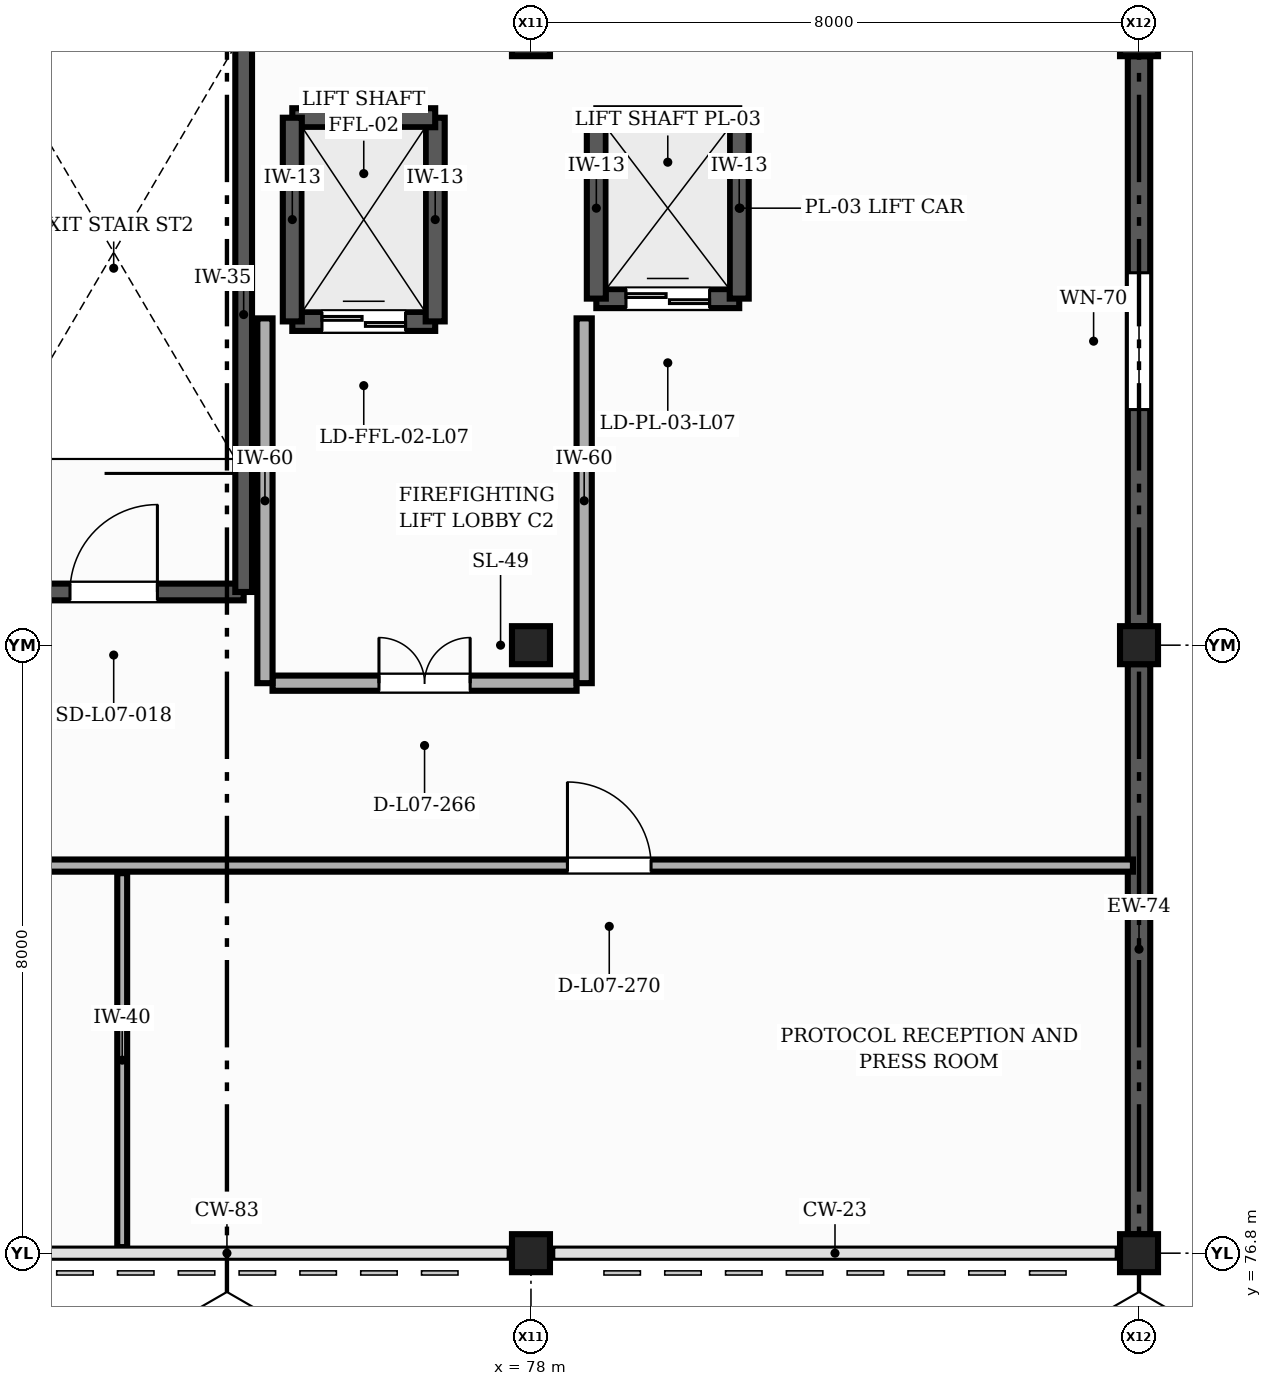
"""IFC4 building model, lengths in metres.
Left out: names, types, materials, properties, quantities, classifications, styles, units other than length and angle.
Written with IfcOpenShell. Run it as: python <this file> out.ifc"""

import sys

from ifc_helpers import new_model, si_unit, direction, frame, frame_2d, origin, origin_2d, place, context, subcontext, project, spatial, rectangle, extrude, element, fill, save


model = new_model("IFC4")
c1 = context("Model", 3, precision=1e-05, world=origin(), true_north=direction((0.0, 1.0)))
c2 = subcontext(c1, "Body", "Model", "MODEL_VIEW")
j1 = project(units=[si_unit("LENGTHUNIT", "METRE"), si_unit("PLANEANGLEUNIT", "RADIAN")], contexts=[c1])
p1 = place(None, origin())
s1 = spatial("IfcSite", under=j1, at=p1, CompositionType="ELEMENT")
p2 = place(p1, origin())
s2 = spatial("IfcBuilding", under=s1, at=p2, CompositionType="ELEMENT")
p3 = place(p2, frame((0.0, 0.0, 29.7)))
s3 = spatial("IfcBuildingStorey", under=s2, at=p3, CompositionType="ELEMENT", Elevation=29.7)
for number, where, z_axis, x_axis in (
    (1, (78.0, 76.8, 0.0), (0.0, 0.0, 1.0), (1.0, 0.0, 0.0)),
    (2, (78.0, 84.8, 0.0), (0.0, 0.0, 1.0), (1.0, 0.0, 0.0)),
    (3, (78.0, 92.8, 0.0), (0.0, 0.0, 1.0), (1.0, 0.0, 0.0)),
    (4, (86.0, 76.8, 0.0), (0.0, 0.0, 1.0), (1.0, 0.0, 0.0)),
    (5, (86.0, 84.8, 0.0), (0.0, 0.0, 1.0), (1.0, 0.0, 0.0)),
    (6, (86.0, 92.8, 0.0), (0.0, 0.0, 1.0), (1.0, 0.0, 0.0)),
):
    element("IfcColumn", number, at=place(p3, frame(where, z_axis=z_axis, x_axis=x_axis)), inside=s3, PredefinedType="COLUMN", context=c2, shape_type="SweptSolid", body=[
        extrude(rectangle(XDim=0.5, YDim=0.5, at=origin_2d()), origin(), (0.0, 0.0, 1.0), 3.9),
    ])
p4 = place(p3, frame((86.0, 77.05, 0.0), z_axis=(0.0, 0.0, 1.0), x_axis=(0.0, 1.0, 0.0)))
e7 = element("IfcWall", 7, at=p4, inside=s3, PredefinedType="SOLIDWALL", context=c2, shape_type="SweptSolid", body=[
    extrude(rectangle(XDim=7.5, YDim=0.295, at=frame_2d((3.75, 0.0))), origin(), (0.0, 0.0, 1.0), 2.98),
])
p5 = place(p3, frame((86.0, 85.05, 0.0), z_axis=(0.0, 0.0, 1.0), x_axis=(0.0, 1.0, 0.0)))
e8 = element("IfcWall", 8, at=p5, inside=s3, PredefinedType="SOLIDWALL", context=c2, shape_type="SweptSolid", body=[
    extrude(rectangle(XDim=7.5, YDim=0.295, at=frame_2d((3.75, 0.0))), origin(), (0.0, 0.0, 1.0), 2.98),
])
p6 = place(p5, frame((2.85, 0.0, 0.9)))
e9 = element("IfcOpeningElement", 9, at=p6, cuts=e8, PredefinedType="OPENING", context=c2, shape_type="SweptSolid", body=[
    extrude(rectangle(XDim=1.8, YDim=1.4, at=frame_2d((0.9, 0.7))), frame((0.0, 0.157, 0.0), z_axis=(0.0, -1.0, 0.0), x_axis=(1.0, 0.0, 0.0)), (0.0, 0.0, 1.0), 0.315),
])
p7 = place(p3, frame((70.8, 85.5, 0.0), z_axis=(0.0, 0.0, 1.0), x_axis=(1.0, 0.0, 0.0)))
e10 = element("IfcWall", 10, at=p7, inside=s3, PredefinedType="SHEAR", context=c2, shape_type="SweptSolid", body=[
    extrude(rectangle(XDim=3.42, YDim=0.22, at=frame_2d((1.71, 0.0))), origin(), (0.0, 0.0, 1.0), 3.9),
])
p8 = place(p7, frame((1.135, 0.0, 0.0)))
e11 = element("IfcOpeningElement", 11, at=p8, cuts=e10, PredefinedType="OPENING", context=c2, shape_type="SweptSolid", body=[
    extrude(rectangle(XDim=1.15, YDim=2.15, at=frame_2d((0.575, 1.075))), frame((0.0, 0.12, 0.0), z_axis=(0.0, -1.0, 0.0), x_axis=(1.0, 0.0, 0.0)), (0.0, 0.0, 1.0), 0.24),
])
p9 = place(p3, frame((74.22, 85.5, 0.0), z_axis=(0.0, 0.0, 1.0), x_axis=(0.0, 1.0, 0.0)))
e12 = element("IfcWall", 12, at=p9, inside=s3, PredefinedType="SHEAR", context=c2, shape_type="SweptSolid", body=[
    extrude(rectangle(XDim=7.3, YDim=0.22, at=frame_2d((3.65, 0.0))), origin(), (0.0, 0.0, 1.0), 3.9),
])
p10 = place(p3, frame((74.86, 89.06, 0.0), z_axis=(0.0, 0.0, 1.0), x_axis=(1.0, 0.0, 0.0)))
e13 = element("IfcWall", 13, at=p10, inside=s3, PredefinedType="SHEAR", context=c2, shape_type="SweptSolid", body=[
    extrude(rectangle(XDim=1.88, YDim=0.25, at=frame_2d((0.94, 0.0))), origin(), (0.0, 0.0, 1.0), 5.52),
])
p11 = place(p10, frame((0.39, 0.0, 0.0)))
e14 = element("IfcOpeningElement", 14, at=p11, cuts=e13, PredefinedType="OPENING", context=c2, shape_type="SweptSolid", body=[
    extrude(rectangle(XDim=1.1, YDim=2.2, at=frame_2d((0.55, 1.1))), frame((0.0, 0.135, 0.0), z_axis=(0.0, -1.0, 0.0), x_axis=(1.0, 0.0, 0.0)), (0.0, 0.0, 1.0), 0.27),
])
p12 = place(p3, frame((76.74, 89.06, 0.0), z_axis=(0.0, 0.0, 1.0), x_axis=(0.0, 1.0, 0.0)))
e15 = element("IfcWall", 15, at=p12, inside=s3, PredefinedType="SHEAR", context=c2, shape_type="SweptSolid", body=[
    extrude(rectangle(XDim=2.68, YDim=0.25, at=frame_2d((1.34, 0.0))), origin(), (0.0, 0.0, 1.0), 5.52),
])
p13 = place(p3, frame((76.74, 91.74, 0.0), z_axis=(0.0, 0.0, 1.0), x_axis=(-1.0, 0.0, 0.0)))
e16 = element("IfcWall", 16, at=p13, inside=s3, PredefinedType="SHEAR", context=c2, shape_type="SweptSolid", body=[
    extrude(rectangle(XDim=1.88, YDim=0.25, at=frame_2d((0.94, 0.0))), origin(), (0.0, 0.0, 1.0), 5.52),
])
p14 = place(p3, frame((74.86, 91.74, 0.0), z_axis=(0.0, 0.0, 1.0), x_axis=(0.0, -1.0, 0.0)))
e17 = element("IfcWall", 17, at=p14, inside=s3, PredefinedType="SHEAR", context=c2, shape_type="SweptSolid", body=[
    extrude(rectangle(XDim=2.68, YDim=0.25, at=frame_2d((1.34, 0.0))), origin(), (0.0, 0.0, 1.0), 5.52),
])
p15 = place(p3, frame((78.86, 89.36, 0.0), z_axis=(0.0, 0.0, 1.0), x_axis=(1.0, 0.0, 0.0)))
e18 = element("IfcWall", 18, at=p15, inside=s3, PredefinedType="SHEAR", context=c2, shape_type="SweptSolid", body=[
    extrude(rectangle(XDim=1.88, YDim=0.25, at=frame_2d((0.94, 0.0))), origin(), (0.0, 0.0, 1.0), 5.52),
])
p16 = place(p15, frame((0.39, 0.0, 0.0)))
e19 = element("IfcOpeningElement", 19, at=p16, cuts=e18, PredefinedType="OPENING", context=c2, shape_type="SweptSolid", body=[
    extrude(rectangle(XDim=1.1, YDim=2.2, at=frame_2d((0.55, 1.1))), frame((0.0, 0.135, 0.0), z_axis=(0.0, -1.0, 0.0), x_axis=(1.0, 0.0, 0.0)), (0.0, 0.0, 1.0), 0.27),
])
p17 = place(p3, frame((80.74, 89.36, 0.0), z_axis=(0.0, 0.0, 1.0), x_axis=(0.0, 1.0, 0.0)))
e20 = element("IfcWall", 20, at=p17, inside=s3, PredefinedType="SHEAR", context=c2, shape_type="SweptSolid", body=[
    extrude(rectangle(XDim=2.38, YDim=0.25, at=frame_2d((1.19, 0.0))), origin(), (0.0, 0.0, 1.0), 5.52),
])
p18 = place(p3, frame((80.74, 91.74, 0.0), z_axis=(0.0, 0.0, 1.0), x_axis=(-1.0, 0.0, 0.0)))
e21 = element("IfcWall", 21, at=p18, inside=s3, PredefinedType="SHEAR", context=c2, shape_type="SweptSolid", body=[
    extrude(rectangle(XDim=1.88, YDim=0.25, at=frame_2d((0.94, 0.0))), origin(), (0.0, 0.0, 1.0), 5.52),
])
p19 = place(p3, frame((78.86, 91.74, 0.0), z_axis=(0.0, 0.0, 1.0), x_axis=(0.0, -1.0, 0.0)))
e22 = element("IfcWall", 22, at=p19, inside=s3, PredefinedType="SHEAR", context=c2, shape_type="SweptSolid", body=[
    extrude(rectangle(XDim=2.38, YDim=0.25, at=frame_2d((1.19, 0.0))), origin(), (0.0, 0.0, 1.0), 5.52),
])
p20 = place(p3, frame((74.6, 84.3, 0.0), z_axis=(0.0, 0.0, 1.0), x_axis=(1.0, 0.0, 0.0)))
e23 = element("IfcWall", 23, at=p20, inside=s3, PredefinedType="PARTITIONING", context=c2, shape_type="SweptSolid", body=[
    extrude(rectangle(XDim=4.0, YDim=0.2, at=frame_2d((2.0, 0.0))), origin(), (0.0, 0.0, 1.0), 2.915),
])
p21 = place(p20, frame((1.4, 0.0, 0.0)))
e24 = element("IfcOpeningElement", 24, at=p21, cuts=e23, PredefinedType="OPENING", context=c2, shape_type="SweptSolid", body=[
    extrude(rectangle(XDim=1.2, YDim=2.15, at=frame_2d((0.6, 1.075))), frame((0.0, 0.11, 0.0), z_axis=(0.0, -1.0, 0.0), x_axis=(1.0, 0.0, 0.0)), (0.0, 0.0, 1.0), 0.22),
])
p22 = place(p3, frame((74.5, 84.3, 0.0), z_axis=(0.0, 0.0, 1.0), x_axis=(0.0, 1.0, 0.0)))
e25 = element("IfcWall", 25, at=p22, inside=s3, PredefinedType="PARTITIONING", context=c2, shape_type="SweptSolid", body=[
    extrude(rectangle(XDim=4.8, YDim=0.2, at=frame_2d((2.4, 0.0))), origin(), (0.0, 0.0, 1.0), 3.065),
])
p23 = place(p3, frame((78.7, 84.3, 0.0), z_axis=(0.0, 0.0, 1.0), x_axis=(0.0, 1.0, 0.0)))
e26 = element("IfcWall", 26, at=p23, inside=s3, PredefinedType="PARTITIONING", context=c2, shape_type="SweptSolid", body=[
    extrude(rectangle(XDim=4.8, YDim=0.2, at=frame_2d((2.4, 0.0))), origin(), (0.0, 0.0, 1.0), 2.765),
])
p24 = place(p3, frame((72.622, 76.88, 0.0), z_axis=(0.0, 0.0, 1.0), x_axis=(0.0, 1.0, 0.0)))
e27 = element("IfcWall", 27, at=p24, inside=s3, PredefinedType="PARTITIONING", context=c2, shape_type="SweptSolid", body=[
    extrude(rectangle(XDim=4.92, YDim=0.13, at=frame_2d((2.46, 0.0))), origin(), (0.0, 0.0, 1.0), 2.965),
])
p25 = place(p3, frame((21.28, 81.9, 0.0), z_axis=(0.0, 0.0, 1.0), x_axis=(1.0, 0.0, 0.0)))
e28 = element("IfcWall", 28, at=p25, inside=s3, PredefinedType="PARTITIONING", context=c2, shape_type="SweptSolid", body=[
    extrude(rectangle(XDim=64.64, YDim=0.16, at=frame_2d((32.32, 0.0))), origin(), (0.0, 0.0, 1.0), 2.915),
])
p26 = place(p25, frame((8.97, 0.0, 0.0)))
e29 = element("IfcOpeningElement", 29, at=p26, cuts=e28, PredefinedType="OPENING", context=c2, shape_type="SweptSolid", body=[
    extrude(rectangle(XDim=1.02, YDim=2.12, at=frame_2d((0.51, 1.06))), frame((0.0, 0.09, 0.0), z_axis=(0.0, -1.0, 0.0), x_axis=(1.0, 0.0, 0.0)), (0.0, 0.0, 1.0), 0.18),
])
p27 = place(p25, frame((26.84, 0.0, 0.0)))
e30 = element("IfcOpeningElement", 30, at=p27, cuts=e28, PredefinedType="OPENING", context=c2, shape_type="SweptSolid", body=[
    extrude(rectangle(XDim=1.05, YDim=2.1, at=frame_2d((0.525, 1.05))), frame((0.0, 0.09, 0.0), z_axis=(0.0, -1.0, 0.0), x_axis=(1.0, 0.0, 0.0)), (0.0, 0.0, 1.0), 0.18),
])
p28 = place(p25, frame((42.89, 0.0, 0.0)))
e31 = element("IfcOpeningElement", 31, at=p28, cuts=e28, PredefinedType="OPENING", context=c2, shape_type="SweptSolid", body=[
    extrude(rectangle(XDim=1.08, YDim=2.14, at=frame_2d((0.54, 1.07))), frame((0.0, 0.09, 0.0), z_axis=(0.0, -1.0, 0.0), x_axis=(1.0, 0.0, 0.0)), (0.0, 0.0, 1.0), 0.18),
])
p29 = place(p25, frame((57.2, 0.0, 0.0)))
e32 = element("IfcOpeningElement", 32, at=p29, cuts=e28, PredefinedType="OPENING", context=c2, shape_type="SweptSolid", body=[
    extrude(rectangle(XDim=1.1, YDim=2.1, at=frame_2d((0.55, 1.05))), frame((0.0, 0.09, 0.0), z_axis=(0.0, -1.0, 0.0), x_axis=(1.0, 0.0, 0.0)), (0.0, 0.0, 1.0), 0.18),
])
p30 = place(p6, origin())
e33 = element("IfcWindow", 33, at=p30, inside=s3, PartitioningType="SINGLE_PANEL", PredefinedType="WINDOW", context=c2, shape_type="SweptSolid", body=[
    extrude(rectangle(XDim=1.8, YDim=1.4, at=frame_2d((0.9, 0.7))), frame((0.0, 0.03, 0.0), z_axis=(0.0, -1.0, 0.0), x_axis=(1.0, 0.0, 0.0)), (0.0, 0.0, 1.0), 0.06),
])
fill(e9, e33)
p31 = place(p8, origin())
e34 = element("IfcDoor", 34, at=p31, inside=s3, OperationType="SINGLE_SWING_RIGHT", PredefinedType="DOOR", context=c2, shape_type="SweptSolid", body=[
    extrude(rectangle(XDim=1.15, YDim=2.15, at=frame_2d((0.575, 1.075))), frame((0.0, 0.025, 0.0), z_axis=(0.0, -1.0, 0.0), x_axis=(1.0, 0.0, 0.0)), (0.0, 0.0, 1.0), 0.05),
])
fill(e11, e34)
p32 = place(p11, origin())
e35 = element("IfcDoor", 35, at=p32, inside=s3, OperationType="DOUBLE_DOOR_SLIDING", PredefinedType="DOOR", context=c2, shape_type="SweptSolid", body=[
    extrude(rectangle(XDim=1.1, YDim=2.2, at=frame_2d((0.55, 1.1))), frame((0.0, 0.025, 0.0), z_axis=(0.0, -1.0, 0.0), x_axis=(1.0, 0.0, 0.0)), (0.0, 0.0, 1.0), 0.05),
])
fill(e14, e35)
p33 = place(p16, origin())
e36 = element("IfcDoor", 36, at=p33, inside=s3, OperationType="DOUBLE_DOOR_SLIDING", PredefinedType="DOOR", context=c2, shape_type="SweptSolid", body=[
    extrude(rectangle(XDim=1.1, YDim=2.2, at=frame_2d((0.55, 1.1))), frame((0.0, 0.025, 0.0), z_axis=(0.0, -1.0, 0.0), x_axis=(1.0, 0.0, 0.0)), (0.0, 0.0, 1.0), 0.05),
])
fill(e19, e36)
p34 = place(p21, origin())
e37 = element("IfcDoor", 37, at=p34, inside=s3, OperationType="DOUBLE_DOOR_SINGLE_SWING", PredefinedType="DOOR", context=c2, shape_type="SweptSolid", body=[
    extrude(rectangle(XDim=1.2, YDim=2.15, at=frame_2d((0.6, 1.075))), frame((0.0, 0.025, 0.0), z_axis=(0.0, -1.0, 0.0), x_axis=(1.0, 0.0, 0.0)), (0.0, 0.0, 1.0), 0.05),
])
fill(e24, e37)
p35 = place(p29, origin())
e38 = element("IfcDoor", 38, at=p35, inside=s3, OperationType="SINGLE_SWING_LEFT", PredefinedType="DOOR", context=c2, shape_type="SweptSolid", body=[
    extrude(rectangle(XDim=1.1, YDim=2.1, at=frame_2d((0.55, 1.05))), frame((0.0, 0.025, 0.0), z_axis=(0.0, -1.0, 0.0), x_axis=(1.0, 0.0, 0.0)), (0.0, 0.0, 1.0), 0.05),
])
fill(e32, e38)
save(model, sys.argv[1])
